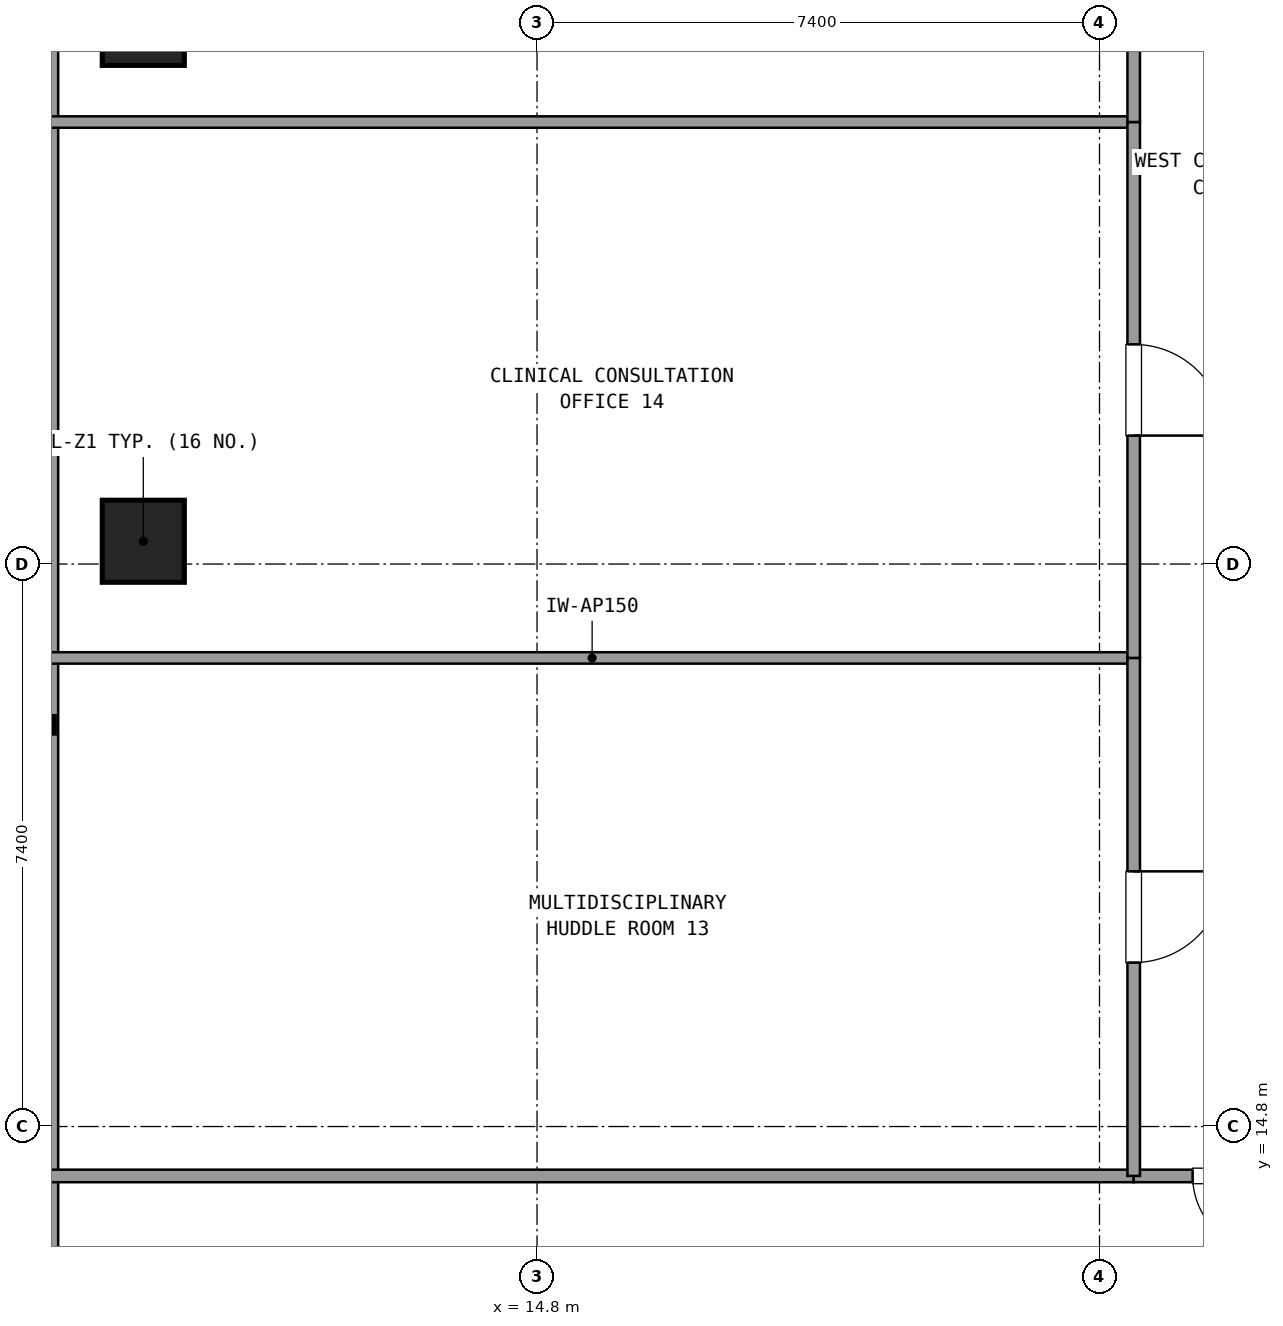
"""IFC4 building model, lengths in metres.
Left out: names, types, materials, properties, quantities, classifications, styles, units other than length and angle.
Written with IfcOpenShell. Run it as: python <this file> out.ifc"""

import sys

from ifc_helpers import new_model, si_unit, direction, frame, frame_2d, origin, origin_2d, place, context, subcontext, project, spatial, rectangle, extrude, element, fill, save


model = new_model("IFC4")
c1 = context("Model", 3, precision=1e-05, world=origin(), true_north=direction((0.0, 1.0)))
c2 = subcontext(c1, "Body", "Model", "MODEL_VIEW")
j1 = project(units=[si_unit("LENGTHUNIT", "METRE"), si_unit("PLANEANGLEUNIT", "RADIAN")], contexts=[c1])
p1 = place(None, origin())
s1 = spatial("IfcSite", under=j1, at=p1, CompositionType="ELEMENT")
p2 = place(p1, origin())
s2 = spatial("IfcBuilding", under=s1, at=p2, CompositionType="ELEMENT")
p3 = place(p2, frame((0.0, 0.0, 38.34)))
s3 = spatial("IfcBuildingStorey", under=s2, at=p3, CompositionType="ELEMENT", Elevation=38.34)
for number, where, z_axis, x_axis in (
    (1, (9.62, 22.5, 0.0), (0.0, 0.0, 1.0), (1.0, 0.0, 0.0)),
    (2, (9.62, 29.3, 0.0), (0.0, 0.0, 1.0), (1.0, 0.0, 0.0)),
):
    element("IfcColumn", number, at=place(p3, frame(where, z_axis=z_axis, x_axis=x_axis)), inside=s3, PredefinedType="COLUMN", context=c2, shape_type="SweptSolid", body=[
        extrude(rectangle(XDim=1.08, YDim=1.08, at=origin_2d()), origin(), (0.0, 0.0, 1.0), 3.6),
    ])
p4 = place(p3, frame((8.38, 43.345, 0.0), z_axis=(0.0, 0.0, 1.0), x_axis=(0.0, -1.0, 0.0)))
e3 = element("IfcWall", 3, at=p4, inside=s3, PredefinedType="SOLIDWALL", context=c2, shape_type="SweptSolid", body=[
    extrude(rectangle(XDim=34.89, YDim=0.24, at=frame_2d((17.445, 0.0))), origin(), (0.0, 0.0, 1.0), 0.85),
])
p5 = place(p3, frame((8.4, 14.15, 0.0), z_axis=(0.0, 0.0, 1.0), x_axis=(1.0, 0.0, 0.0)))
e4 = element("IfcWall", 4, at=p5, inside=s3, PredefinedType="PARTITIONING", context=c2, shape_type="SweptSolid", body=[
    extrude(rectangle(XDim=14.25, YDim=0.165, at=frame_2d((7.125, 0.0))), origin(), (0.0, 0.0, 1.0), 2.61),
])
p6 = place(p3, frame((22.65, 14.15, 0.0), z_axis=(0.0, 0.0, 1.0), x_axis=(1.0, 0.0, 0.0)))
e5 = element("IfcWall", 5, at=p6, inside=s3, PredefinedType="PARTITIONING", context=c2, shape_type="SweptSolid", body=[
    extrude(rectangle(XDim=2.55, YDim=0.165, at=frame_2d((1.275, 0.0))), origin(), (0.0, 0.0, 1.0), 2.61),
])
p7 = place(p6, frame((0.775, 0.0, 0.0)))
e6 = element("IfcOpeningElement", 6, at=p7, cuts=e5, PredefinedType="OPENING", context=c2, shape_type="SweptSolid", body=[
    extrude(rectangle(XDim=1.0, YDim=2.15, at=frame_2d((0.5, 1.075))), frame((0.0, 0.093, 0.0), z_axis=(0.0, -1.0, 0.0), x_axis=(1.0, 0.0, 0.0)), (0.0, 0.0, 1.0), 0.185),
])
p8 = place(p3, frame((22.65, 20.965, 0.0), z_axis=(0.0, 0.0, 1.0), x_axis=(-1.0, 0.0, 0.0)))
e7 = element("IfcWall", 7, at=p8, inside=s3, PredefinedType="PARTITIONING", context=c2, shape_type="SweptSolid", body=[
    extrude(rectangle(XDim=14.25, YDim=0.15, at=frame_2d((7.125, 0.0))), origin(), (0.0, 0.0, 1.0), 2.61),
])
p9 = place(p3, frame((22.65, 14.15, 0.0), z_axis=(0.0, 0.0, 1.0), x_axis=(0.0, 1.0, 0.0)))
e8 = element("IfcWall", 8, at=p9, inside=s3, PredefinedType="PARTITIONING", context=c2, shape_type="SweptSolid", body=[
    extrude(rectangle(XDim=6.815, YDim=0.165, at=frame_2d((3.408, 0.0))), origin(), (0.0, 0.0, 1.0), 2.61),
])
p10 = place(p9, frame((2.807, 0.0, 0.0)))
e9 = element("IfcOpeningElement", 9, at=p10, cuts=e8, PredefinedType="OPENING", context=c2, shape_type="SweptSolid", body=[
    extrude(rectangle(XDim=1.2, YDim=2.15, at=frame_2d((0.6, 1.075))), frame((0.0, 0.093, 0.0), z_axis=(0.0, -1.0, 0.0), x_axis=(1.0, 0.0, 0.0)), (0.0, 0.0, 1.0), 0.185),
])
p11 = place(p3, frame((22.65, 28.015, 0.0), z_axis=(0.0, 0.0, 1.0), x_axis=(-1.0, 0.0, 0.0)))
e10 = element("IfcWall", 10, at=p11, inside=s3, PredefinedType="PARTITIONING", context=c2, shape_type="SweptSolid", body=[
    extrude(rectangle(XDim=14.25, YDim=0.15, at=frame_2d((7.125, 0.0))), origin(), (0.0, 0.0, 1.0), 2.61),
])
p12 = place(p3, frame((22.65, 20.965, 0.0), z_axis=(0.0, 0.0, 1.0), x_axis=(0.0, 1.0, 0.0)))
e11 = element("IfcWall", 11, at=p12, inside=s3, PredefinedType="PARTITIONING", context=c2, shape_type="SweptSolid", body=[
    extrude(rectangle(XDim=7.05, YDim=0.165, at=frame_2d((3.525, 0.0))), origin(), (0.0, 0.0, 1.0), 2.61),
])
p13 = place(p12, frame((2.925, 0.0, 0.0)))
e12 = element("IfcOpeningElement", 12, at=p13, cuts=e11, PredefinedType="OPENING", context=c2, shape_type="SweptSolid", body=[
    extrude(rectangle(XDim=1.2, YDim=2.15, at=frame_2d((0.6, 1.075))), frame((0.0, 0.093, 0.0), z_axis=(0.0, -1.0, 0.0), x_axis=(1.0, 0.0, 0.0)), (0.0, 0.0, 1.0), 0.185),
])
p14 = place(p3, frame((22.65, 28.015, 0.0), z_axis=(0.0, 0.0, 1.0), x_axis=(0.0, 1.0, 0.0)))
e13 = element("IfcWall", 13, at=p14, inside=s3, PredefinedType="PARTITIONING", context=c2, shape_type="SweptSolid", body=[
    extrude(rectangle(XDim=4.239, YDim=0.165, at=frame_2d((2.12, 0.0))), origin(), (0.0, 0.0, 1.0), 2.61),
])
p15 = place(p14, frame((1.519, 0.0, 0.0)))
e14 = element("IfcOpeningElement", 14, at=p15, cuts=e13, PredefinedType="OPENING", context=c2, shape_type="SweptSolid", body=[
    extrude(rectangle(XDim=1.2, YDim=2.15, at=frame_2d((0.6, 1.075))), frame((0.0, 0.093, 0.0), z_axis=(0.0, -1.0, 0.0), x_axis=(1.0, 0.0, 0.0)), (0.0, 0.0, 1.0), 0.185),
])
p16 = place(p7, frame((1.0, 0.0, 0.0), z_axis=(0.0, 0.0, 1.0), x_axis=(-1.0, 0.0, 0.0)))
e15 = element("IfcDoor", 15, at=p16, inside=s3, OperationType="SINGLE_SWING_RIGHT", PredefinedType="DOOR", context=c2, shape_type="SweptSolid", body=[
    extrude(rectangle(XDim=1.0, YDim=2.15, at=frame_2d((0.5, 1.075))), frame((0.0, 0.025, 0.0), z_axis=(0.0, -1.0, 0.0), x_axis=(1.0, 0.0, 0.0)), (0.0, 0.0, 1.0), 0.05),
])
fill(e6, e15)
p17 = place(p10, frame((1.2, 0.0, 0.0), z_axis=(0.0, 0.0, 1.0), x_axis=(-1.0, 0.0, 0.0)))
e16 = element("IfcDoor", 16, at=p17, inside=s3, OperationType="SINGLE_SWING_RIGHT", PredefinedType="DOOR", context=c2, shape_type="SweptSolid", body=[
    extrude(rectangle(XDim=1.2, YDim=2.15, at=frame_2d((0.6, 1.075))), frame((0.0, 0.025, 0.0), z_axis=(0.0, -1.0, 0.0), x_axis=(1.0, 0.0, 0.0)), (0.0, 0.0, 1.0), 0.05),
])
fill(e9, e16)
p18 = place(p13, frame((1.2, 0.0, 0.0), z_axis=(0.0, 0.0, 1.0), x_axis=(-1.0, 0.0, 0.0)))
e17 = element("IfcDoor", 17, at=p18, inside=s3, OperationType="SINGLE_SWING_LEFT", PredefinedType="DOOR", context=c2, shape_type="SweptSolid", body=[
    extrude(rectangle(XDim=1.2, YDim=2.15, at=frame_2d((0.6, 1.075))), frame((0.0, 0.025, 0.0), z_axis=(0.0, -1.0, 0.0), x_axis=(1.0, 0.0, 0.0)), (0.0, 0.0, 1.0), 0.05),
])
fill(e12, e17)
save(model, sys.argv[1])
